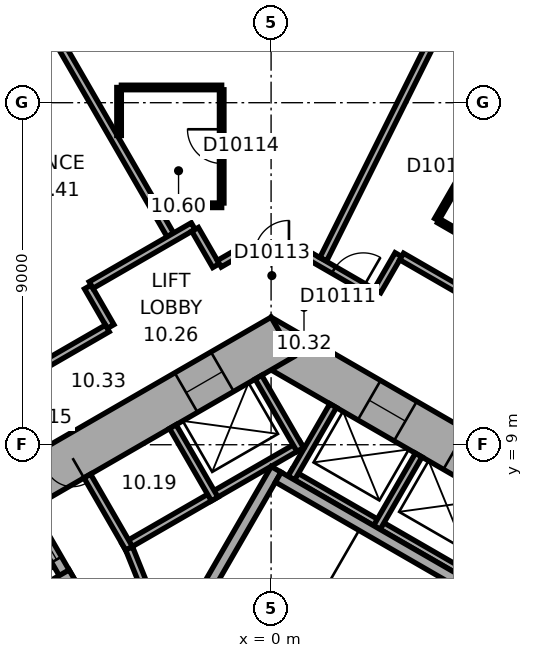
"""IFC4 building model, lengths in metres.
Left out: names, types, materials, properties, quantities, classifications, styles, units other than length and angle.
Written with IfcOpenShell. Run it as: python <this file> out.ifc"""

import sys

from ifc_helpers import new_model, si_unit, direction, frame, frame_2d, origin, place, context, subcontext, project, spatial, rectangle, extrude, element, fill, save


model = new_model("IFC4")
c1 = context("Model", 3, precision=1e-05, world=origin(), true_north=direction((0.0, 1.0)))
c2 = subcontext(c1, "Body", "Model", "MODEL_VIEW")
j1 = project(units=[si_unit("LENGTHUNIT", "METRE"), si_unit("PLANEANGLEUNIT", "RADIAN")], contexts=[c1])
p1 = place(None, origin())
s1 = spatial("IfcSite", under=j1, at=p1, CompositionType="ELEMENT")
p2 = place(p1, origin())
s2 = spatial("IfcBuilding", under=s1, at=p2, CompositionType="ELEMENT")
p3 = place(p2, frame((0.0, 0.0, 53.9)))
s3 = spatial("IfcBuildingStorey", under=s2, at=p3, CompositionType="ELEMENT", Elevation=53.9)
p4 = place(p3, frame((10.4, 5.658, 0.0), z_axis=(0.0, 0.0, 1.0), x_axis=(-0.866021384402, 0.500006961711, 0.0)))
e1 = element("IfcWall", 1, at=p4, inside=s3, PredefinedType="SHEAR", context=c2, shape_type="SweptSolid", body=[
    extrude(rectangle(XDim=12.355, YDim=1.2, at=frame_2d((6.178, 0.0))), origin(), (0.0, 0.0, 1.0), 3.3),
])
p5 = place(p4, frame((2.728, 0.0, 0.0)))
e2 = element("IfcOpeningElement", 2, at=p5, cuts=e1, PredefinedType="OPENING", context=c2, shape_type="SweptSolid", body=[
    extrude(rectangle(XDim=1.1, YDim=2.1, at=frame_2d((0.55, 1.05))), frame((0.0, 0.61, 0.0), z_axis=(0.0, -1.0, 0.0), x_axis=(1.0, 0.0, 0.0)), (0.0, 0.0, 1.0), 1.22),
])
p6 = place(p4, frame((5.328, 0.0, 0.0)))
e3 = element("IfcOpeningElement", 3, at=p6, cuts=e1, PredefinedType="OPENING", context=c2, shape_type="SweptSolid", body=[
    extrude(rectangle(XDim=1.1, YDim=2.1, at=frame_2d((0.55, 1.05))), frame((0.0, 0.61, 0.0), z_axis=(0.0, -1.0, 0.0), x_axis=(1.0, 0.0, 0.0)), (0.0, 0.0, 1.0), 1.22),
])
p7 = place(p4, frame((7.928, 0.0, 0.0)))
e4 = element("IfcOpeningElement", 4, at=p7, cuts=e1, PredefinedType="OPENING", context=c2, shape_type="SweptSolid", body=[
    extrude(rectangle(XDim=1.1, YDim=2.1, at=frame_2d((0.55, 1.05))), frame((0.0, 0.61, 0.0), z_axis=(0.0, -1.0, 0.0), x_axis=(1.0, 0.0, 0.0)), (0.0, 0.0, 1.0), 1.22),
])
p8 = place(p3, frame((0.3, 11.836, 0.0), z_axis=(0.0, 0.0, 1.0), x_axis=(-0.866021384402, -0.500006961711, 0.0)))
e5 = element("IfcWall", 5, at=p8, inside=s3, PredefinedType="SHEAR", context=c2, shape_type="SweptSolid", body=[
    extrude(rectangle(XDim=12.355, YDim=1.2, at=frame_2d((6.178, 0.0))), origin(), (0.0, 0.0, 1.0), 3.3),
])
p9 = place(p8, frame((6.378, 0.0, 0.0)))
e6 = element("IfcOpeningElement", 6, at=p9, cuts=e5, PredefinedType="OPENING", context=c2, shape_type="SweptSolid", body=[
    extrude(rectangle(XDim=1.5, YDim=2.1, at=frame_2d((0.75, 1.05))), frame((0.0, 0.61, 0.0), z_axis=(0.0, -1.0, 0.0), x_axis=(1.0, 0.0, 0.0)), (0.0, 0.0, 1.0), 1.22),
])
p10 = place(p8, frame((1.828, 0.0, 0.0)))
e7 = element("IfcOpeningElement", 7, at=p10, cuts=e5, PredefinedType="OPENING", context=c2, shape_type="SweptSolid", body=[
    extrude(rectangle(XDim=1.1, YDim=2.1, at=frame_2d((0.55, 1.05))), frame((0.0, 0.61, 0.0), z_axis=(0.0, -1.0, 0.0), x_axis=(1.0, 0.0, 0.0)), (0.0, 0.0, 1.0), 1.22),
])
p11 = place(p3, frame((20.63, 15.47, 0.0), z_axis=(0.0, 0.0, 1.0), x_axis=(-0.894934518609, 0.446197498203, 0.0)))
e8 = element("IfcWall", 8, at=p11, inside=s3, PredefinedType="STANDARD", context=c2, shape_type="SweptSolid", body=[
    extrude(rectangle(XDim=21.246, YDim=0.2, at=frame_2d((10.623, 0.0))), origin(), (0.0, 0.0, 1.0), 3.3),
])
p12 = place(p11, frame((1.553, 0.0, 0.8)))
e9 = element("IfcOpeningElement", 9, at=p12, cuts=e8, PredefinedType="OPENING", context=c2, shape_type="SweptSolid", body=[
    extrude(rectangle(XDim=2.4, YDim=1.7, at=frame_2d((1.2, 0.85))), frame((0.0, 0.11, 0.0), z_axis=(0.0, -1.0, 0.0), x_axis=(1.0, 0.0, 0.0)), (0.0, 0.0, 1.0), 0.22),
])
p13 = place(p11, frame((5.488, 0.0, 0.8)))
e10 = element("IfcOpeningElement", 10, at=p13, cuts=e8, PredefinedType="OPENING", context=c2, shape_type="SweptSolid", body=[
    extrude(rectangle(XDim=2.4, YDim=1.7, at=frame_2d((1.2, 0.85))), frame((0.0, 0.11, 0.0), z_axis=(0.0, -1.0, 0.0), x_axis=(1.0, 0.0, 0.0)), (0.0, 0.0, 1.0), 0.22),
])
p14 = place(p11, frame((9.422, 0.0, 0.8)))
e11 = element("IfcOpeningElement", 11, at=p14, cuts=e8, PredefinedType="OPENING", context=c2, shape_type="SweptSolid", body=[
    extrude(rectangle(XDim=2.4, YDim=1.7, at=frame_2d((1.2, 0.85))), frame((0.0, 0.11, 0.0), z_axis=(0.0, -1.0, 0.0), x_axis=(1.0, 0.0, 0.0)), (0.0, 0.0, 1.0), 0.22),
])
p15 = place(p11, frame((13.357, 0.0, 0.8)))
e12 = element("IfcOpeningElement", 12, at=p15, cuts=e8, PredefinedType="OPENING", context=c2, shape_type="SweptSolid", body=[
    extrude(rectangle(XDim=2.4, YDim=1.7, at=frame_2d((1.2, 0.85))), frame((0.0, 0.11, 0.0), z_axis=(0.0, -1.0, 0.0), x_axis=(1.0, 0.0, 0.0)), (0.0, 0.0, 1.0), 0.22),
])
p16 = place(p11, frame((17.292, 0.0, 0.8)))
e13 = element("IfcOpeningElement", 13, at=p16, cuts=e8, PredefinedType="OPENING", context=c2, shape_type="SweptSolid", body=[
    extrude(rectangle(XDim=2.4, YDim=1.7, at=frame_2d((1.2, 0.85))), frame((0.0, 0.11, 0.0), z_axis=(0.0, -1.0, 0.0), x_axis=(1.0, 0.0, 0.0)), (0.0, 0.0, 1.0), 0.22),
])
p17 = place(p3, frame((-3.136, 24.805, 0.0), z_axis=(0.0, 0.0, 1.0), x_axis=(-0.866028291626, -0.499994998079, 0.0)))
e14 = element("IfcWall", 14, at=p17, inside=s3, PredefinedType="STANDARD", context=c2, shape_type="SweptSolid", body=[
    extrude(rectangle(XDim=21.246, YDim=0.2, at=frame_2d((10.623, 0.0))), origin(), (0.0, 0.0, 1.0), 3.3),
])
p18 = place(p17, frame((1.555, 0.0, 0.8)))
e15 = element("IfcOpeningElement", 15, at=p18, cuts=e14, PredefinedType="OPENING", context=c2, shape_type="SweptSolid", body=[
    extrude(rectangle(XDim=2.4, YDim=1.7, at=frame_2d((1.2, 0.85))), frame((0.0, 0.11, 0.0), z_axis=(0.0, -1.0, 0.0), x_axis=(1.0, 0.0, 0.0)), (0.0, 0.0, 1.0), 0.22),
])
p19 = place(p17, frame((5.489, 0.0, 0.8)))
e16 = element("IfcOpeningElement", 16, at=p19, cuts=e14, PredefinedType="OPENING", context=c2, shape_type="SweptSolid", body=[
    extrude(rectangle(XDim=2.4, YDim=1.7, at=frame_2d((1.2, 0.85))), frame((0.0, 0.11, 0.0), z_axis=(0.0, -1.0, 0.0), x_axis=(1.0, 0.0, 0.0)), (0.0, 0.0, 1.0), 0.22),
])
p20 = place(p17, frame((9.424, 0.0, 0.8)))
e17 = element("IfcOpeningElement", 17, at=p20, cuts=e14, PredefinedType="OPENING", context=c2, shape_type="SweptSolid", body=[
    extrude(rectangle(XDim=2.4, YDim=1.7, at=frame_2d((1.2, 0.85))), frame((0.0, 0.11, 0.0), z_axis=(0.0, -1.0, 0.0), x_axis=(1.0, 0.0, 0.0)), (0.0, 0.0, 1.0), 0.22),
])
p21 = place(p17, frame((13.358, 0.0, 0.8)))
e18 = element("IfcOpeningElement", 18, at=p21, cuts=e14, PredefinedType="OPENING", context=c2, shape_type="SweptSolid", body=[
    extrude(rectangle(XDim=2.4, YDim=1.7, at=frame_2d((1.2, 0.85))), frame((0.0, 0.11, 0.0), z_axis=(0.0, -1.0, 0.0), x_axis=(1.0, 0.0, 0.0)), (0.0, 0.0, 1.0), 0.22),
])
p22 = place(p17, frame((17.293, 0.0, 0.8)))
e19 = element("IfcOpeningElement", 19, at=p22, cuts=e14, PredefinedType="OPENING", context=c2, shape_type="SweptSolid", body=[
    extrude(rectangle(XDim=2.4, YDim=1.7, at=frame_2d((1.2, 0.85))), frame((0.0, 0.11, 0.0), z_axis=(0.0, -1.0, 0.0), x_axis=(1.0, 0.0, 0.0)), (0.0, 0.0, 1.0), 0.22),
])
p23 = place(p3, frame((7.424, 4.259, 0.0), z_axis=(0.0, 0.0, 1.0), x_axis=(-0.866026010844, 0.49999894854, 0.0)))
e20 = element("IfcWall", 20, at=p23, inside=s3, PredefinedType="PARTITIONING", context=c2, shape_type="SweptSolid", body=[
    extrude(rectangle(XDim=8.0, YDim=0.2, at=frame_2d((4.0, 0.0))), origin(), (0.0, 0.0, 1.0), 3.05),
])
for number, where, z_axis, x_axis in (
    (21, (2.784, 6.822, 0.0), (0.0, 0.0, 1.0), (0.5, 0.866, 0.0)),
    (22, (0.532, 8.122, 0.0), (0.0, 0.0, 1.0), (0.5, 0.866, 0.0)),
):
    element("IfcWall", number, at=place(p3, frame(where, z_axis=z_axis, x_axis=x_axis)), inside=s3, PredefinedType="PARTITIONING", context=c2, shape_type="SweptSolid", body=[
        extrude(rectangle(XDim=2.2, YDim=0.2, at=frame_2d((1.1, 0.0))), origin(), (0.0, 0.0, 1.0), 3.05),
    ])
p24 = place(p3, frame((0.803, 9.009, 0.0), z_axis=(0.0, 0.0, 1.0), x_axis=(-0.866028230842, -0.499995103361, 0.0)))
e23 = element("IfcWall", 23, at=p24, inside=s3, PredefinedType="PARTITIONING", context=c2, shape_type="SweptSolid", body=[
    extrude(rectangle(XDim=5.4, YDim=0.2, at=frame_2d((2.7, 0.0))), origin(), (0.0, 0.0, 1.0), 3.05),
])
p25 = place(p3, frame((0.767, 8.872, 0.0), z_axis=(0.0, 0.0, 1.0), x_axis=(-0.499994660107, 0.866028486751, 0.0)))
e24 = element("IfcWall", 24, at=p25, inside=s3, PredefinedType="PARTITIONING", context=c2, shape_type="SweptSolid", body=[
    extrude(rectangle(XDim=2.2, YDim=0.2, at=frame_2d((1.1, 0.0))), origin(), (0.0, 0.0, 1.0), 3.05),
])
for number, where, z_axis, x_axis in (
    (25, (-1.485, 7.572, 0.0), (0.0, 0.0, 1.0), (-0.5, 0.866, 0.0)),
    (26, (-3.737, 6.272, 0.0), (0.0, 0.0, 1.0), (-0.5, 0.866, 0.0)),
):
    element("IfcWall", number, at=place(p3, frame(where, z_axis=z_axis, x_axis=x_axis)), inside=s3, PredefinedType="PARTITIONING", context=c2, shape_type="SweptSolid", body=[
        extrude(rectangle(XDim=2.2, YDim=0.2, at=frame_2d((1.1, 0.0))), origin(), (0.0, 0.0, 1.0), 3.05),
    ])
p26 = place(p3, frame((-2.216, 4.282, 0.0), z_axis=(0.0, 0.0, 1.0), x_axis=(0.499977259774, 0.866038532462, 0.0)))
e27 = element("IfcWall", 27, at=p26, inside=s3, PredefinedType="SHEAR", context=c2, shape_type="SweptSolid", body=[
    extrude(rectangle(XDim=4.7, YDim=0.3, at=frame_2d((2.35, 0.0))), origin(), (0.0, 0.0, 1.0), 3.05),
])
p27 = place(p3, frame((6.303, 4.617, 0.0), z_axis=(0.0, 0.0, 1.0), x_axis=(-0.866027801685, 0.499995846692, 0.0)))
e28 = element("IfcWall", 28, at=p27, inside=s3, PredefinedType="SHEAR", context=c2, shape_type="SweptSolid", body=[
    extrude(rectangle(XDim=7.06, YDim=0.3, at=frame_2d((3.53, 0.0))), origin(), (0.0, 0.0, 1.0), 3.05),
])
p28 = place(p3, frame((-5.295, 5.372, 0.0), z_axis=(0.0, 0.0, 1.0), x_axis=(-0.500077893725, 0.86598042715, 0.0)))
e29 = element("IfcWall", 29, at=p28, inside=s3, PredefinedType="SHEAR", context=c2, shape_type="SweptSolid", body=[
    extrude(rectangle(XDim=2.2, YDim=0.3, at=frame_2d((1.1, 0.0))), origin(), (0.0, 0.0, 1.0), 3.05),
])
p29 = place(p28, frame((0.7, 0.0, 0.0)))
e30 = element("IfcOpeningElement", 30, at=p29, cuts=e29, PredefinedType="OPENING", context=c2, shape_type="SweptSolid", body=[
    extrude(rectangle(XDim=1.1, YDim=2.1, at=frame_2d((0.55, 1.05))), frame((0.0, 0.16, 0.0), z_axis=(0.0, -1.0, 0.0), x_axis=(1.0, 0.0, 0.0)), (0.0, 0.0, 1.0), 0.32),
])
p30 = place(p3, frame((-5.24, 5.577, 0.0), z_axis=(0.0, 0.0, 1.0), x_axis=(-0.866014461049, -0.500018952895, 0.0)))
e31 = element("IfcWall", 31, at=p30, inside=s3, PredefinedType="SHEAR", context=c2, shape_type="SweptSolid", body=[
    extrude(rectangle(XDim=3.35, YDim=0.3, at=frame_2d((1.675, 0.0))), origin(), (0.0, 0.0, 1.0), 3.05),
])
p31 = place(p3, frame((-2.615, 3.487, 0.0), z_axis=(0.0, 0.0, 1.0), x_axis=(-0.373576831041, 0.92759924068, 0.0)))
e32 = element("IfcWall", 32, at=p31, inside=s3, PredefinedType="PARTITIONING", context=c2, shape_type="SweptSolid", body=[
    extrude(rectangle(XDim=3.002, YDim=0.2, at=frame_2d((1.501, 0.0))), origin(), (0.0, 0.0, 1.0), 3.05),
])
p32 = place(p3, frame((-6.676, 21.492, 0.0), z_axis=(0.0, 0.0, 1.0), x_axis=(0.500011263043, -0.866018900966, 0.0)))
e33 = element("IfcWall", 33, at=p32, inside=s3, PredefinedType="PARTITIONING", context=c2, shape_type="SweptSolid", body=[
    extrude(rectangle(XDim=8.049, YDim=0.2, at=frame_2d((4.024, 0.0))), origin(), (0.0, 0.0, 1.0), 3.05),
])
p33 = place(p3, frame((-4.823, 13.152, 0.0), z_axis=(0.0, 0.0, 1.0), x_axis=(0.499986357472, -0.866033280158, 0.0)))
e34 = element("IfcWall", 34, at=p33, inside=s3, PredefinedType="PARTITIONING", context=c2, shape_type="SweptSolid", body=[
    extrude(rectangle(XDim=1.201, YDim=0.2, at=frame_2d((0.601, 0.0))), origin(), (0.0, 0.0, 1.0), 3.05),
])
p34 = place(p3, frame((-4.309, 12.061, 0.0), z_axis=(0.0, 0.0, 1.0), x_axis=(-0.866020679205, -0.500008183122, 0.0)))
e35 = element("IfcWall", 35, at=p34, inside=s3, PredefinedType="PARTITIONING", context=c2, shape_type="SweptSolid", body=[
    extrude(rectangle(XDim=5.104, YDim=0.2, at=frame_2d((2.552, 0.0))), origin(), (0.0, 0.0, 1.0), 3.05),
])
p35 = place(p34, frame((2.052, 0.0, 0.0)))
e36 = element("IfcOpeningElement", 36, at=p35, cuts=e35, PredefinedType="OPENING", context=c2, shape_type="SweptSolid", body=[
    extrude(rectangle(XDim=1.0, YDim=2.1, at=frame_2d((0.5, 1.05))), frame((0.0, 0.11, 0.0), z_axis=(0.0, -1.0, 0.0), x_axis=(1.0, 0.0, 0.0)), (0.0, 0.0, 1.0), 0.22),
])
p36 = place(p3, frame((-4.0, 17.137, 0.0), z_axis=(0.0, 0.0, 1.0), x_axis=(0.0, 1.0, 0.0)))
e37 = element("IfcWall", 37, at=p36, inside=s3, PredefinedType="PARTITIONING", context=c2, shape_type="SweptSolid", body=[
    extrude(rectangle(XDim=1.263, YDim=0.12, at=frame_2d((0.632, 0.0))), origin(), (0.0, 0.0, 1.0), 3.05),
])
p37 = place(p3, frame((-3.94, 18.401, 0.0), z_axis=(0.0, 0.0, 1.0), x_axis=(1.0, 0.0, 0.0)))
e38 = element("IfcWall", 38, at=p37, inside=s3, PredefinedType="PARTITIONING", context=c2, shape_type="SweptSolid", body=[
    extrude(rectangle(XDim=2.64, YDim=0.12, at=frame_2d((1.32, 0.0))), origin(), (0.0, 0.0, 1.0), 3.05),
])
p38 = place(p3, frame((-2.05, 14.752, 0.0), z_axis=(0.0, 0.0, 1.0), x_axis=(-0.866030936828, -0.499990416364, 0.0)))
e39 = element("IfcWall", 39, at=p38, inside=s3, PredefinedType="PARTITIONING", context=c2, shape_type="SweptSolid", body=[
    extrude(rectangle(XDim=3.102, YDim=0.2, at=frame_2d((1.551, 0.0))), origin(), (0.0, 0.0, 1.0), 3.05),
])
p39 = place(p3, frame((-1.449, 13.712, 0.0), z_axis=(0.0, 0.0, 1.0), x_axis=(-0.499978356969, 0.866037899034, 0.0)))
e40 = element("IfcWall", 40, at=p39, inside=s3, PredefinedType="PARTITIONING", context=c2, shape_type="SweptSolid", body=[
    extrude(rectangle(XDim=1.101, YDim=0.2, at=frame_2d((0.551, 0.0))), origin(), (0.0, 0.0, 1.0), 3.05),
])
p40 = place(p3, frame((-1.3, 15.301, 0.0), z_axis=(0.0, 0.0, 1.0), x_axis=(-1.0, 0.0, 0.0)))
e41 = element("IfcWall", 41, at=p40, inside=s3, PredefinedType="PARTITIONING", context=c2, shape_type="SweptSolid", body=[
    extrude(rectangle(XDim=1.661, YDim=0.12, at=frame_2d((0.831, 0.0))), origin(), (0.0, 0.0, 1.0), 3.05),
])
p41 = place(p3, frame((-1.3, 18.341, 0.0), z_axis=(0.0, 0.0, 1.0), x_axis=(0.0, -1.0, 0.0)))
e42 = element("IfcWall", 42, at=p41, inside=s3, PredefinedType="PARTITIONING", context=c2, shape_type="SweptSolid", body=[
    extrude(rectangle(XDim=2.98, YDim=0.12, at=frame_2d((1.49, 0.0))), origin(), (0.0, 0.0, 1.0), 3.05),
])
p42 = place(p41, frame((1.04, 0.0, 0.0)))
e43 = element("IfcOpeningElement", 43, at=p42, cuts=e42, PredefinedType="OPENING", context=c2, shape_type="SweptSolid", body=[
    extrude(rectangle(XDim=0.9, YDim=2.1, at=frame_2d((0.45, 1.05))), frame((0.0, 0.07, 0.0), z_axis=(0.0, -1.0, 0.0), x_axis=(1.0, 0.0, 0.0)), (0.0, 0.0, 1.0), 0.14),
])
p43 = place(p3, frame((-0.95, 14.001, 0.0), z_axis=(0.0, 0.0, 1.0), x_axis=(-0.86609177584, -0.499885022602, 0.0)))
e44 = element("IfcWall", 44, at=p43, inside=s3, PredefinedType="PARTITIONING", context=c2, shape_type="SweptSolid", body=[
    extrude(rectangle(XDim=0.477, YDim=0.2, at=frame_2d((0.238, 0.0))), origin(), (0.0, 0.0, 1.0), 3.05),
])
p44 = place(p3, frame((0.95, 14.001, 0.0), z_axis=(0.0, 0.0, 1.0), x_axis=(-1.0, 0.0, 0.0)))
e45 = element("IfcWall", 45, at=p44, inside=s3, PredefinedType="PARTITIONING", context=c2, shape_type="SweptSolid", body=[
    extrude(rectangle(XDim=1.86, YDim=0.2, at=frame_2d((0.93, 0.0))), origin(), (0.0, 0.0, 1.0), 3.05),
])
p45 = place(p44, frame((0.48, 0.0, 0.0)))
e46 = element("IfcOpeningElement", 46, at=p45, cuts=e45, PredefinedType="OPENING", context=c2, shape_type="SweptSolid", body=[
    extrude(rectangle(XDim=0.9, YDim=2.1, at=frame_2d((0.45, 1.05))), frame((0.0, 0.11, 0.0), z_axis=(0.0, -1.0, 0.0), x_axis=(1.0, 0.0, 0.0)), (0.0, 0.0, 1.0), 0.22),
])
p46 = place(p3, frame((2.748, 12.962, 0.0), z_axis=(0.0, 0.0, 1.0), x_axis=(-0.866013897511, 0.50001992892, 0.0)))
e47 = element("IfcWall", 47, at=p46, inside=s3, PredefinedType="PARTITIONING", context=c2, shape_type="SweptSolid", body=[
    extrude(rectangle(XDim=2.037, YDim=0.2, at=frame_2d((1.018, 0.0))), origin(), (0.0, 0.0, 1.0), 3.05),
])
p47 = place(p46, frame((0.372, 0.0, 0.0)))
e48 = element("IfcOpeningElement", 48, at=p47, cuts=e47, PredefinedType="OPENING", context=c2, shape_type="SweptSolid", body=[
    extrude(rectangle(XDim=0.9, YDim=2.1, at=frame_2d((0.45, 1.05))), frame((0.0, 0.11, 0.0), z_axis=(0.0, -1.0, 0.0), x_axis=(1.0, 0.0, 0.0)), (0.0, 0.0, 1.0), 0.22),
])
p48 = place(p3, frame((3.349, 14.002, 0.0), z_axis=(0.0, 0.0, 1.0), x_axis=(-0.500074377092, -0.865982457891, 0.0)))
e49 = element("IfcWall", 49, at=p48, inside=s3, PredefinedType="PARTITIONING", context=c2, shape_type="SweptSolid", body=[
    extrude(rectangle(XDim=1.101, YDim=0.2, at=frame_2d((0.55, 0.0))), origin(), (0.0, 0.0, 1.0), 3.05),
])
p49 = place(p3, frame((4.356, 14.922, 0.0), z_axis=(0.0, 0.0, 1.0), x_axis=(0.499936506574, 0.866062058628, 0.0)))
e50 = element("IfcWall", 50, at=p49, inside=s3, PredefinedType="PARTITIONING", context=c2, shape_type="SweptSolid", body=[
    extrude(rectangle(XDim=2.6, YDim=0.12, at=frame_2d((1.3, 0.0))), origin(), (0.0, 0.0, 1.0), 3.05),
])
p50 = place(p49, frame((0.85, 0.0, 0.0)))
e51 = element("IfcOpeningElement", 51, at=p50, cuts=e50, PredefinedType="OPENING", context=c2, shape_type="SweptSolid", body=[
    extrude(rectangle(XDim=0.9, YDim=2.1, at=frame_2d((0.45, 1.05))), frame((0.0, 0.07, 0.0), z_axis=(0.0, -1.0, 0.0), x_axis=(1.0, 0.0, 0.0)), (0.0, 0.0, 1.0), 0.14),
])
p51 = place(p3, frame((5.351, 21.859, 0.0), z_axis=(0.0, 0.0, 1.0), x_axis=(-0.446205309328, -0.894930624086, 0.0)))
e52 = element("IfcWall", 52, at=p51, inside=s3, PredefinedType="PARTITIONING", context=c2, shape_type="SweptSolid", body=[
    extrude(rectangle(XDim=8.913, YDim=0.2, at=frame_2d((4.457, 0.0))), origin(), (0.0, 0.0, 1.0), 2.6),
])
p52 = place(p3, frame((5.569, 14.222, 0.0), z_axis=(0.0, 0.0, 1.0), x_axis=(-0.866036909293, 0.499980071345, 0.0)))
e53 = element("IfcWall", 53, at=p52, inside=s3, PredefinedType="PARTITIONING", context=c2, shape_type="SweptSolid", body=[
    extrude(rectangle(XDim=1.34, YDim=0.12, at=frame_2d((0.67, 0.0))), origin(), (0.0, 0.0, 1.0), 3.05),
])
p53 = place(p3, frame((10.972, 9.602, 0.0), z_axis=(0.0, 0.0, 1.0), x_axis=(-0.866033277307, 0.499986362411, 0.0)))
e54 = element("IfcWall", 54, at=p53, inside=s3, PredefinedType="PARTITIONING", context=c2, shape_type="SweptSolid", body=[
    extrude(rectangle(XDim=8.702, YDim=0.2, at=frame_2d((4.351, 0.0))), origin(), (0.0, 0.0, 1.0), 3.05),
])
p54 = place(p53, frame((4.364, 0.0, 0.0)))
e55 = element("IfcOpeningElement", 55, at=p54, cuts=e54, PredefinedType="OPENING", context=c2, shape_type="SweptSolid", body=[
    extrude(rectangle(XDim=0.9, YDim=2.1, at=frame_2d((0.45, 1.05))), frame((0.0, 0.11, 0.0), z_axis=(0.0, -1.0, 0.0), x_axis=(1.0, 0.0, 0.0)), (0.0, 0.0, 1.0), 0.22),
])
p55 = place(p9, origin())
e56 = element("IfcDoor", 56, at=p55, inside=s3, OperationType="DOUBLE_DOOR_SINGLE_SWING", PredefinedType="DOOR", context=c2, shape_type="SweptSolid", body=[
    extrude(rectangle(XDim=1.5, YDim=2.1, at=frame_2d((0.75, 1.05))), frame((0.0, 0.025, 0.0), z_axis=(0.0, -1.0, 0.0), x_axis=(1.0, 0.0, 0.0)), (0.0, 0.0, 1.0), 0.05),
])
fill(e6, e56)
p56 = place(p29, origin())
e57 = element("IfcDoor", 57, at=p56, inside=s3, OperationType="DOUBLE_DOOR_SLIDING", PredefinedType="DOOR", context=c2, shape_type="SweptSolid", body=[
    extrude(rectangle(XDim=1.1, YDim=2.1, at=frame_2d((0.55, 1.05))), frame((0.0, 0.025, 0.0), z_axis=(0.0, -1.0, 0.0), x_axis=(1.0, 0.0, 0.0)), (0.0, 0.0, 1.0), 0.05),
])
fill(e30, e57)
p57 = place(p7, origin())
e58 = element("IfcDoor", 58, at=p57, inside=s3, OperationType="DOUBLE_DOOR_SLIDING", PredefinedType="DOOR", context=c2, shape_type="SweptSolid", body=[
    extrude(rectangle(XDim=1.1, YDim=2.1, at=frame_2d((0.55, 1.05))), frame((0.0, 0.025, 0.0), z_axis=(0.0, -1.0, 0.0), x_axis=(1.0, 0.0, 0.0)), (0.0, 0.0, 1.0), 0.05),
])
fill(e4, e58)
p58 = place(p10, origin())
e59 = element("IfcDoor", 59, at=p58, inside=s3, OperationType="DOUBLE_DOOR_SLIDING", PredefinedType="DOOR", context=c2, shape_type="SweptSolid", body=[
    extrude(rectangle(XDim=1.1, YDim=2.1, at=frame_2d((0.55, 1.05))), frame((0.0, 0.025, 0.0), z_axis=(0.0, -1.0, 0.0), x_axis=(1.0, 0.0, 0.0)), (0.0, 0.0, 1.0), 0.05),
])
fill(e7, e59)
p59 = place(p47, origin())
e60 = element("IfcDoor", 60, at=p59, inside=s3, OperationType="SINGLE_SWING_LEFT", PredefinedType="DOOR", context=c2, shape_type="SweptSolid", body=[
    extrude(rectangle(XDim=0.9, YDim=2.1, at=frame_2d((0.45, 1.05))), frame((0.0, 0.025, 0.0), z_axis=(0.0, -1.0, 0.0), x_axis=(1.0, 0.0, 0.0)), (0.0, 0.0, 1.0), 0.05),
])
fill(e48, e60)
p60 = place(p50, origin())
e61 = element("IfcDoor", 61, at=p60, inside=s3, OperationType="SINGLE_SWING_LEFT", PredefinedType="DOOR", context=c2, shape_type="SweptSolid", body=[
    extrude(rectangle(XDim=0.9, YDim=2.1, at=frame_2d((0.45, 1.05))), frame((0.0, 0.025, 0.0), z_axis=(0.0, -1.0, 0.0), x_axis=(1.0, 0.0, 0.0)), (0.0, 0.0, 1.0), 0.05),
])
fill(e51, e61)
p61 = place(p45, origin())
e62 = element("IfcDoor", 62, at=p61, inside=s3, OperationType="SINGLE_SWING_LEFT", PredefinedType="DOOR", context=c2, shape_type="SweptSolid", body=[
    extrude(rectangle(XDim=0.9, YDim=2.1, at=frame_2d((0.45, 1.05))), frame((0.0, 0.025, 0.0), z_axis=(0.0, -1.0, 0.0), x_axis=(1.0, 0.0, 0.0)), (0.0, 0.0, 1.0), 0.05),
])
fill(e46, e62)
p62 = place(p42, origin())
e63 = element("IfcDoor", 63, at=p62, inside=s3, OperationType="SINGLE_SWING_LEFT", PredefinedType="DOOR", context=c2, shape_type="SweptSolid", body=[
    extrude(rectangle(XDim=0.9, YDim=2.1, at=frame_2d((0.45, 1.05))), frame((0.0, 0.025, 0.0), z_axis=(0.0, -1.0, 0.0), x_axis=(1.0, 0.0, 0.0)), (0.0, 0.0, 1.0), 0.05),
])
fill(e43, e63)
save(model, sys.argv[1])
